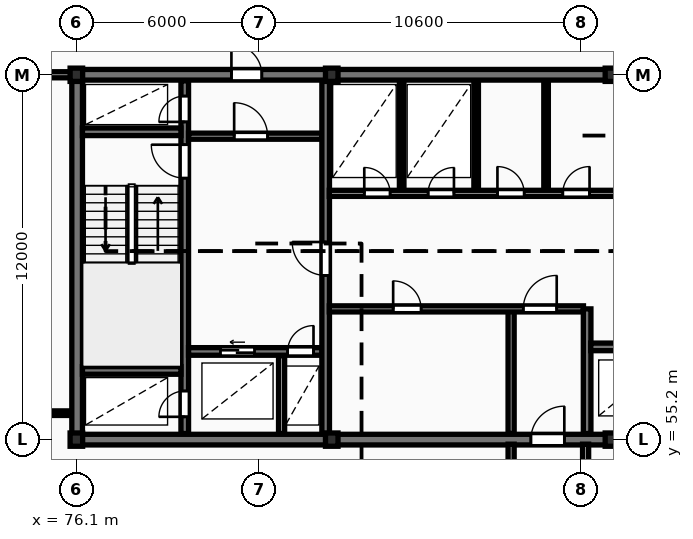
"""IFC4 building model, lengths in metres.
Left out: names, types, materials, properties, quantities, classifications, styles, units other than length and angle.
Written with IfcOpenShell. Run it as: python <this file> out.ifc"""

import sys

from ifc_helpers import new_model, si_unit, direction, frame, frame_2d, origin, origin_2d, place, context, subcontext, project, spatial, rectangle, i_section, extrude, element, fill, save


model = new_model("IFC4")
c1 = context("Model", 3, precision=1e-05, world=origin(), true_north=direction((0.0, 1.0)))
c2 = subcontext(c1, "Body", "Model", "MODEL_VIEW")
j1 = project(units=[si_unit("LENGTHUNIT", "METRE"), si_unit("PLANEANGLEUNIT", "RADIAN")], contexts=[c1])
p1 = place(None, origin())
s1 = spatial("IfcSite", under=j1, at=p1, CompositionType="ELEMENT")
p2 = place(p1, origin())
s2 = spatial("IfcBuilding", under=s1, at=p2, CompositionType="ELEMENT")
p3 = place(p2, frame((0.0, 0.0, 150.1)))
s3 = spatial("IfcBuildingStorey", under=s2, at=p3, CompositionType="ELEMENT", Elevation=150.1)
for number, where, z_axis, x_axis in (
    (1, (76.1, 55.2, 0.0), (0.0, 0.0, 1.0), (1.0, 0.0, 0.0)),
    (2, (76.1, 67.2, 0.0), (0.0, 0.0, 1.0), (1.0, 0.0, 0.0)),
    (3, (84.5, 55.2, 0.0), (0.0, 0.0, 1.0), (1.0, 0.0, 0.0)),
    (4, (84.5, 67.2, 0.0), (0.0, 0.0, 1.0), (1.0, 0.0, 0.0)),
    (5, (93.7, 55.2, 0.0), (0.0, 0.0, 1.0), (1.0, 0.0, 0.0)),
    (6, (93.7, 67.2, 0.0), (0.0, 0.0, 1.0), (1.0, 0.0, 0.0)),
):
    element("IfcColumn", number, at=place(p3, frame(where, z_axis=z_axis, x_axis=x_axis)), inside=s3, PredefinedType="COLUMN", context=c2, shape_type="SweptSolid", body=[
        extrude(i_section(OverallWidth=0.412, OverallDepth=0.437, WebThickness=0.036, FlangeThickness=0.052, FilletRadius=0.015, at=origin_2d()), origin(), (0.0, 0.0, 1.0), 3.6),
    ])
p4 = place(p3, frame((75.95, 55.2, 0.0), z_axis=(0.0, 0.0, 1.0), x_axis=(1.0, 0.0, 0.0)))
e7 = element("IfcWall", 7, at=p4, inside=s3, PredefinedType="SHEAR", context=c2, shape_type="SweptSolid", body=[
    extrude(rectangle(XDim=36.3, YDim=0.35, at=frame_2d((18.15, 0.0))), origin(), (0.0, 0.0, 1.0), 3.6),
])
p5 = place(p4, frame((15.1, 0.0, 0.0)))
e8 = element("IfcOpeningElement", 8, at=p5, cuts=e7, PredefinedType="OPENING", context=c2, shape_type="SweptSolid", body=[
    extrude(rectangle(XDim=1.1, YDim=2.1, at=frame_2d((0.55, 1.05))), frame((0.0, 0.185, 0.0), z_axis=(0.0, -1.0, 0.0), x_axis=(1.0, 0.0, 0.0)), (0.0, 0.0, 1.0), 0.37),
])
p6 = place(p3, frame((76.125, 55.375, 0.0), z_axis=(0.0, 0.0, 1.0), x_axis=(0.0, 1.0, 0.0)))
e9 = element("IfcWall", 9, at=p6, inside=s3, PredefinedType="SHEAR", context=c2, shape_type="SweptSolid", body=[
    extrude(rectangle(XDim=11.65, YDim=0.35, at=frame_2d((5.825, 0.0))), origin(), (0.0, 0.0, 1.0), 3.6),
])
p7 = place(p3, frame((75.95, 67.2, 0.0), z_axis=(0.0, 0.0, 1.0), x_axis=(1.0, 0.0, 0.0)))
e10 = element("IfcWall", 10, at=p7, inside=s3, PredefinedType="SHEAR", context=c2, shape_type="SweptSolid", body=[
    extrude(rectangle(XDim=36.3, YDim=0.35, at=frame_2d((18.15, 0.0))), origin(), (0.0, 0.0, 1.0), 3.6),
])
p8 = place(p7, frame((5.25, 0.0, 0.0)))
e11 = element("IfcOpeningElement", 11, at=p8, cuts=e10, PredefinedType="OPENING", context=c2, shape_type="SweptSolid", body=[
    extrude(rectangle(XDim=1.0, YDim=2.15, at=frame_2d((0.5, 1.075))), frame((0.0, 0.185, 0.0), z_axis=(0.0, -1.0, 0.0), x_axis=(1.0, 0.0, 0.0)), (0.0, 0.0, 1.0), 0.37),
])
p9 = place(p7, frame((21.6, 0.0, 0.0)))
e12 = element("IfcOpeningElement", 12, at=p9, cuts=e10, PredefinedType="OPENING", context=c2, shape_type="SweptSolid", body=[
    extrude(rectangle(XDim=1.5, YDim=2.2, at=frame_2d((0.75, 1.1))), frame((0.0, 0.185, 0.0), z_axis=(0.0, -1.0, 0.0), x_axis=(1.0, 0.0, 0.0)), (0.0, 0.0, 1.0), 0.37),
])
p10 = place(p7, frame((30.45, 0.0, 0.0)))
e13 = element("IfcOpeningElement", 13, at=p10, cuts=e10, PredefinedType="OPENING", context=c2, shape_type="SweptSolid", body=[
    extrude(rectangle(XDim=1.0, YDim=2.15, at=frame_2d((0.5, 1.075))), frame((0.0, 0.185, 0.0), z_axis=(0.0, -1.0, 0.0), x_axis=(1.0, 0.0, 0.0)), (0.0, 0.0, 1.0), 0.37),
])
p11 = place(p3, frame((79.665, 55.4, 0.0), z_axis=(0.0, 0.0, 1.0), x_axis=(0.0, 1.0, 0.0)))
e14 = element("IfcWall", 14, at=p11, inside=s3, PredefinedType="SHEAR", context=c2, shape_type="SweptSolid", body=[
    extrude(rectangle(XDim=11.6, YDim=0.25, at=frame_2d((5.8, 0.0))), origin(), (0.0, 0.0, 1.0), 3.6),
])
p12 = place(p11, frame((0.55, 0.0, 0.0)))
e15 = element("IfcOpeningElement", 15, at=p12, cuts=e14, PredefinedType="OPENING", context=c2, shape_type="SweptSolid", body=[
    extrude(rectangle(XDim=0.85, YDim=2.05, at=frame_2d((0.425, 1.025))), frame((0.0, 0.135, 0.0), z_axis=(0.0, -1.0, 0.0), x_axis=(1.0, 0.0, 0.0)), (0.0, 0.0, 1.0), 0.27),
])
p13 = place(p11, frame((8.4, 0.0, 0.0)))
e16 = element("IfcOpeningElement", 16, at=p13, cuts=e14, PredefinedType="OPENING", context=c2, shape_type="SweptSolid", body=[
    extrude(rectangle(XDim=1.1, YDim=2.1, at=frame_2d((0.55, 1.05))), frame((0.0, 0.135, 0.0), z_axis=(0.0, -1.0, 0.0), x_axis=(1.0, 0.0, 0.0)), (0.0, 0.0, 1.0), 0.27),
])
p14 = place(p11, frame((10.25, 0.0, 0.0)))
e17 = element("IfcOpeningElement", 17, at=p14, cuts=e14, PredefinedType="OPENING", context=c2, shape_type="SweptSolid", body=[
    extrude(rectangle(XDim=0.85, YDim=2.05, at=frame_2d((0.425, 1.025))), frame((0.0, 0.135, 0.0), z_axis=(0.0, -1.0, 0.0), x_axis=(1.0, 0.0, 0.0)), (0.0, 0.0, 1.0), 0.27),
])
for number, where, z_axis, x_axis in (
    (18, (76.3, 57.475, 0.0), (0.0, 0.0, 1.0), (1.0, 0.0, 0.0)),
    (19, (76.3, 65.325, 0.0), (0.0, 0.0, 1.0), (1.0, 0.0, 0.0)),
):
    element("IfcWall", number, at=place(p3, frame(where, z_axis=z_axis, x_axis=x_axis)), inside=s3, PredefinedType="SHEAR", context=c2, shape_type="SweptSolid", body=[
        extrude(rectangle(XDim=3.24, YDim=0.25, at=frame_2d((1.62, 0.0))), origin(), (0.0, 0.0, 1.0), 3.6),
    ])
p15 = place(p3, frame((79.79, 58.1, 0.0), z_axis=(0.0, 0.0, 1.0), x_axis=(1.0, 0.0, 0.0)))
e20 = element("IfcWall", 20, at=p15, inside=s3, PredefinedType="SHEAR", context=c2, shape_type="SweptSolid", body=[
    extrude(rectangle(XDim=4.39, YDim=0.25, at=frame_2d((2.195, 0.0))), origin(), (0.0, 0.0, 1.0), 3.6),
])
p16 = place(p15, frame((1.05, 0.0, 0.0)))
e21 = element("IfcOpeningElement", 21, at=p16, cuts=e20, PredefinedType="OPENING", context=c2, shape_type="SweptSolid", body=[
    extrude(rectangle(XDim=1.12, YDim=2.12, at=frame_2d((0.56, 1.06))), frame((0.0, 0.135, 0.0), z_axis=(0.0, -1.0, 0.0), x_axis=(1.0, 0.0, 0.0)), (0.0, 0.0, 1.0), 0.27),
])
p17 = place(p15, frame((3.26, 0.0, 0.0)))
e22 = element("IfcOpeningElement", 22, at=p17, cuts=e20, PredefinedType="OPENING", context=c2, shape_type="SweptSolid", body=[
    extrude(rectangle(XDim=0.85, YDim=2.05, at=frame_2d((0.425, 1.025))), frame((0.0, 0.135, 0.0), z_axis=(0.0, -1.0, 0.0), x_axis=(1.0, 0.0, 0.0)), (0.0, 0.0, 1.0), 0.27),
])
p18 = place(p3, frame((82.85, 55.4, 0.0), z_axis=(0.0, 0.0, 1.0), x_axis=(0.0, 1.0, 0.0)))
e23 = element("IfcWall", 23, at=p18, inside=s3, PredefinedType="PARTITIONING", context=c2, shape_type="SweptSolid", body=[
    extrude(rectangle(XDim=2.56, YDim=0.2, at=frame_2d((1.28, 0.0))), origin(), (0.0, 0.0, 1.0), 3.31),
])
p19 = place(p3, frame((79.79, 65.18, 0.0), z_axis=(0.0, 0.0, 1.0), x_axis=(1.0, 0.0, 0.0)))
e24 = element("IfcWall", 24, at=p19, inside=s3, PredefinedType="PARTITIONING", context=c2, shape_type="SweptSolid", body=[
    extrude(rectangle(XDim=4.39, YDim=0.2, at=frame_2d((2.195, 0.0))), origin(), (0.0, 0.0, 1.0), 3.31),
])
p20 = place(p19, frame((1.5, 0.0, 0.0)))
e25 = element("IfcOpeningElement", 25, at=p20, cuts=e24, PredefinedType="OPENING", context=c2, shape_type="SweptSolid", body=[
    extrude(rectangle(XDim=1.1, YDim=2.1, at=frame_2d((0.55, 1.05))), frame((0.0, 0.11, 0.0), z_axis=(0.0, -1.0, 0.0), x_axis=(1.0, 0.0, 0.0)), (0.0, 0.0, 1.0), 0.22),
])
p21 = place(p3, frame((84.3, 55.4, 0.0), z_axis=(0.0, 0.0, 1.0), x_axis=(0.0, 1.0, 0.0)))
e26 = element("IfcWall", 26, at=p21, inside=s3, PredefinedType="SHEAR", context=c2, shape_type="SweptSolid", body=[
    extrude(rectangle(XDim=11.6, YDim=0.25, at=frame_2d((5.8, 0.0))), origin(), (0.0, 0.0, 1.0), 3.6),
])
p22 = place(p21, frame((5.2, 0.0, 0.0)))
e27 = element("IfcOpeningElement", 27, at=p22, cuts=e26, PredefinedType="OPENING", context=c2, shape_type="SweptSolid", body=[
    extrude(rectangle(XDim=1.1, YDim=2.1, at=frame_2d((0.55, 1.05))), frame((0.0, 0.135, 0.0), z_axis=(0.0, -1.0, 0.0), x_axis=(1.0, 0.0, 0.0)), (0.0, 0.0, 1.0), 0.27),
])
p23 = place(p3, frame((90.4, 55.4, 0.0), z_axis=(0.0, 0.0, 1.0), x_axis=(0.0, 1.0, 0.0)))
e28 = element("IfcWall", 28, at=p23, inside=s3, PredefinedType="PARTITIONING", context=c2, shape_type="SweptSolid", body=[
    extrude(rectangle(XDim=4.1, YDim=0.2, at=frame_2d((2.05, 0.0))), origin(), (0.0, 0.0, 1.0), 3.31),
])
p24 = place(p3, frame((84.42, 59.5, 0.0), z_axis=(0.0, 0.0, 1.0), x_axis=(1.0, 0.0, 0.0)))
e29 = element("IfcWall", 29, at=p24, inside=s3, PredefinedType="PARTITIONING", context=c2, shape_type="SweptSolid", body=[
    extrude(rectangle(XDim=8.36, YDim=0.2, at=frame_2d((4.18, 0.0))), origin(), (0.0, 0.0, 1.0), 3.31),
])
p25 = place(p24, frame((2.1, 0.0, 0.0)))
e30 = element("IfcOpeningElement", 30, at=p25, cuts=e29, PredefinedType="OPENING", context=c2, shape_type="SweptSolid", body=[
    extrude(rectangle(XDim=0.92, YDim=2.08, at=frame_2d((0.46, 1.04))), frame((0.0, 0.11, 0.0), z_axis=(0.0, -1.0, 0.0), x_axis=(1.0, 0.0, 0.0)), (0.0, 0.0, 1.0), 0.22),
])
p26 = place(p24, frame((6.38, 0.0, 0.0)))
e31 = element("IfcOpeningElement", 31, at=p26, cuts=e29, PredefinedType="OPENING", context=c2, shape_type="SweptSolid", body=[
    extrude(rectangle(XDim=1.1, YDim=2.1, at=frame_2d((0.55, 1.05))), frame((0.0, 0.11, 0.0), z_axis=(0.0, -1.0, 0.0), x_axis=(1.0, 0.0, 0.0)), (0.0, 0.0, 1.0), 0.22),
])
p27 = place(p3, frame((92.9, 55.4, 0.0), z_axis=(0.0, 0.0, 1.0), x_axis=(0.0, 1.0, 0.0)))
e32 = element("IfcWall", 32, at=p27, inside=s3, PredefinedType="SHEAR", context=c2, shape_type="SweptSolid", body=[
    extrude(rectangle(XDim=4.1, YDim=0.25, at=frame_2d((2.05, 0.0))), origin(), (0.0, 0.0, 1.0), 3.6),
])
p28 = place(p3, frame((93.02, 58.25, 0.0), z_axis=(0.0, 0.0, 1.0), x_axis=(1.0, 0.0, 0.0)))
e33 = element("IfcWall", 33, at=p28, inside=s3, PredefinedType="SHEAR", context=c2, shape_type="SweptSolid", body=[
    extrude(rectangle(XDim=8.36, YDim=0.25, at=frame_2d((4.18, 0.0))), origin(), (0.0, 0.0, 1.0), 3.6),
])
p29 = place(p28, frame((0.82, 0.0, 0.0)))
e34 = element("IfcOpeningElement", 34, at=p29, cuts=e33, PredefinedType="OPENING", context=c2, shape_type="SweptSolid", body=[
    extrude(rectangle(XDim=1.12, YDim=2.12, at=frame_2d((0.56, 1.06))), frame((0.0, 0.135, 0.0), z_axis=(0.0, -1.0, 0.0), x_axis=(1.0, 0.0, 0.0)), (0.0, 0.0, 1.0), 0.27),
])
p30 = place(p28, frame((3.62, 0.0, 0.0)))
e35 = element("IfcOpeningElement", 35, at=p30, cuts=e33, PredefinedType="OPENING", context=c2, shape_type="SweptSolid", body=[
    extrude(rectangle(XDim=1.12, YDim=2.12, at=frame_2d((0.56, 1.06))), frame((0.0, 0.135, 0.0), z_axis=(0.0, -1.0, 0.0), x_axis=(1.0, 0.0, 0.0)), (0.0, 0.0, 1.0), 0.27),
])
p31 = place(p28, frame((6.42, 0.0, 0.0)))
e36 = element("IfcOpeningElement", 36, at=p31, cuts=e33, PredefinedType="OPENING", context=c2, shape_type="SweptSolid", body=[
    extrude(rectangle(XDim=1.12, YDim=2.12, at=frame_2d((0.56, 1.06))), frame((0.0, 0.135, 0.0), z_axis=(0.0, -1.0, 0.0), x_axis=(1.0, 0.0, 0.0)), (0.0, 0.0, 1.0), 0.27),
])
for number, where, z_axis, x_axis in (
    (37, (86.8, 63.4, 0.0), (0.0, 0.0, 1.0), (0.0, 1.0, 0.0)),
    (38, (89.25, 63.4, 0.0), (0.0, 0.0, 1.0), (0.0, 1.0, 0.0)),
    (39, (91.55, 63.4, 0.0), (0.0, 0.0, 1.0), (0.0, 1.0, 0.0)),
):
    element("IfcWall", number, at=place(p3, frame(where, z_axis=z_axis, x_axis=x_axis)), inside=s3, PredefinedType="PARTITIONING", context=c2, shape_type="SweptSolid", body=[
        extrude(rectangle(XDim=3.6, YDim=0.15, at=frame_2d((1.8, 0.0))), origin(), (0.0, 0.0, 1.0), 3.31),
    ])
p32 = place(p3, frame((84.42, 63.3, 0.0), z_axis=(0.0, 0.0, 1.0), x_axis=(1.0, 0.0, 0.0)))
e40 = element("IfcWall", 40, at=p32, inside=s3, PredefinedType="PARTITIONING", context=c2, shape_type="SweptSolid", body=[
    extrude(rectangle(XDim=19.83, YDim=0.2, at=frame_2d((9.915, 0.0))), origin(), (0.0, 0.0, 1.0), 3.31),
])
p33 = place(p32, frame((1.15, 0.0, 0.0)))
e41 = element("IfcOpeningElement", 41, at=p33, cuts=e40, PredefinedType="OPENING", context=c2, shape_type="SweptSolid", body=[
    extrude(rectangle(XDim=0.85, YDim=2.05, at=frame_2d((0.425, 1.025))), frame((0.0, 0.11, 0.0), z_axis=(0.0, -1.0, 0.0), x_axis=(1.0, 0.0, 0.0)), (0.0, 0.0, 1.0), 0.22),
])
p34 = place(p32, frame((3.25, 0.0, 0.0)))
e42 = element("IfcOpeningElement", 42, at=p34, cuts=e40, PredefinedType="OPENING", context=c2, shape_type="SweptSolid", body=[
    extrude(rectangle(XDim=0.85, YDim=2.05, at=frame_2d((0.425, 1.025))), frame((0.0, 0.11, 0.0), z_axis=(0.0, -1.0, 0.0), x_axis=(1.0, 0.0, 0.0)), (0.0, 0.0, 1.0), 0.22),
])
p35 = place(p32, frame((13.08, 0.0, 0.0)))
e43 = element("IfcOpeningElement", 43, at=p35, cuts=e40, PredefinedType="OPENING", context=c2, shape_type="SweptSolid", body=[
    extrude(rectangle(XDim=1.5, YDim=2.2, at=frame_2d((0.75, 1.1))), frame((0.0, 0.11, 0.0), z_axis=(0.0, -1.0, 0.0), x_axis=(1.0, 0.0, 0.0)), (0.0, 0.0, 1.0), 0.22),
])
p36 = place(p32, frame((5.53, 0.0, 0.0)))
e44 = element("IfcOpeningElement", 44, at=p36, cuts=e40, PredefinedType="OPENING", context=c2, shape_type="SweptSolid", body=[
    extrude(rectangle(XDim=0.88, YDim=2.06, at=frame_2d((0.44, 1.03))), frame((0.0, 0.11, 0.0), z_axis=(0.0, -1.0, 0.0), x_axis=(1.0, 0.0, 0.0)), (0.0, 0.0, 1.0), 0.22),
])
p37 = place(p32, frame((7.68, 0.0, 0.0)))
e45 = element("IfcOpeningElement", 45, at=p37, cuts=e40, PredefinedType="OPENING", context=c2, shape_type="SweptSolid", body=[
    extrude(rectangle(XDim=0.88, YDim=2.06, at=frame_2d((0.44, 1.03))), frame((0.0, 0.11, 0.0), z_axis=(0.0, -1.0, 0.0), x_axis=(1.0, 0.0, 0.0)), (0.0, 0.0, 1.0), 0.22),
])
p38 = place(p32, frame((10.43, 0.0, 0.0)))
e46 = element("IfcOpeningElement", 46, at=p38, cuts=e40, PredefinedType="OPENING", context=c2, shape_type="SweptSolid", body=[
    extrude(rectangle(XDim=0.85, YDim=2.05, at=frame_2d((0.425, 1.025))), frame((0.0, 0.11, 0.0), z_axis=(0.0, -1.0, 0.0), x_axis=(1.0, 0.0, 0.0)), (0.0, 0.0, 1.0), 0.22),
])
p39 = place(p32, frame((16.23, 0.0, 0.0)))
e47 = element("IfcOpeningElement", 47, at=p39, cuts=e40, PredefinedType="OPENING", context=c2, shape_type="SweptSolid", body=[
    extrude(rectangle(XDim=0.96, YDim=2.1, at=frame_2d((0.48, 1.05))), frame((0.0, 0.11, 0.0), z_axis=(0.0, -1.0, 0.0), x_axis=(1.0, 0.0, 0.0)), (0.0, 0.0, 1.0), 0.22),
])
p40 = place(p32, frame((18.68, 0.0, 0.0)))
e48 = element("IfcOpeningElement", 48, at=p40, cuts=e40, PredefinedType="OPENING", context=c2, shape_type="SweptSolid", body=[
    extrude(rectangle(XDim=0.84, YDim=2.04, at=frame_2d((0.42, 1.02))), frame((0.0, 0.11, 0.0), z_axis=(0.0, -1.0, 0.0), x_axis=(1.0, 0.0, 0.0)), (0.0, 0.0, 1.0), 0.22),
])
p41 = place(p3, frame((69.17, 56.07, 0.0), z_axis=(0.0, 0.0, 1.0), x_axis=(1.0, 0.0, 0.0)))
e49 = element("IfcWall", 49, at=p41, inside=s3, PredefinedType="PARTITIONING", context=c2, shape_type="SweptSolid", body=[
    extrude(rectangle(XDim=6.76, YDim=0.15, at=frame_2d((3.38, 0.0))), origin(), (0.0, 0.0, 1.0), 3.31),
])
p42 = place(p41, frame((1.362, 0.0, 0.0)))
e50 = element("IfcOpeningElement", 50, at=p42, cuts=e49, PredefinedType="OPENING", context=c2, shape_type="SweptSolid", body=[
    extrude(rectangle(XDim=0.84, YDim=2.04, at=frame_2d((0.42, 1.02))), frame((0.0, 0.085, 0.0), z_axis=(0.0, -1.0, 0.0), x_axis=(1.0, 0.0, 0.0)), (0.0, 0.0, 1.0), 0.17),
])
p43 = place(p41, frame((4.277, 0.0, 0.0)))
e51 = element("IfcOpeningElement", 51, at=p43, cuts=e49, PredefinedType="OPENING", context=c2, shape_type="SweptSolid", body=[
    extrude(rectangle(XDim=0.88, YDim=2.06, at=frame_2d((0.44, 1.03))), frame((0.0, 0.085, 0.0), z_axis=(0.0, -1.0, 0.0), x_axis=(1.0, 0.0, 0.0)), (0.0, 0.0, 1.0), 0.17),
])
p44 = place(p3, frame((57.6, 67.2, 0.0), z_axis=(0.0, 0.0, 1.0), x_axis=(1.0, 0.0, 0.0)))
e52 = element("IfcWall", 52, at=p44, inside=s3, PredefinedType="PARTITIONING", context=c2, shape_type="SweptSolid", body=[
    extrude(rectangle(XDim=18.35, YDim=0.2, at=frame_2d((9.175, 0.0))), origin(), (0.0, 0.0, 1.0), 2.773),
])
p45 = place(p44, frame((11.87, 0.0, 0.0)))
e53 = element("IfcOpeningElement", 53, at=p45, cuts=e52, PredefinedType="OPENING", context=c2, shape_type="SweptSolid", body=[
    extrude(rectangle(XDim=0.95, YDim=2.15, at=frame_2d((0.475, 1.075))), frame((0.0, 0.11, 0.0), z_axis=(0.0, -1.0, 0.0), x_axis=(1.0, 0.0, 0.0)), (0.0, 0.0, 1.0), 0.22),
])
for number, where, z_axis, x_axis in (
    (54, (90.4, 50.85, 0.0), (0.0, 0.0, 1.0), (0.0, 1.0, 0.0)),
    (55, (92.85, 50.85, 0.0), (0.0, 0.0, 1.0), (0.0, 1.0, 0.0)),
):
    element("IfcWall", number, at=place(p3, frame(where, z_axis=z_axis, x_axis=x_axis)), inside=s3, PredefinedType="PARTITIONING", context=c2, shape_type="SweptSolid", body=[
        extrude(rectangle(XDim=4.2, YDim=0.2, at=frame_2d((2.1, 0.0))), origin(), (0.0, 0.0, 1.0), 3.31),
    ])
p46 = place(p5, origin())
e56 = element("IfcDoor", 56, at=p46, inside=s3, OperationType="SINGLE_SWING_RIGHT", PredefinedType="DOOR", context=c2, shape_type="SweptSolid", body=[
    extrude(rectangle(XDim=1.1, YDim=2.1, at=frame_2d((0.55, 1.05))), frame((0.0, 0.025, 0.0), z_axis=(0.0, -1.0, 0.0), x_axis=(1.0, 0.0, 0.0)), (0.0, 0.0, 1.0), 0.05),
])
fill(e8, e56)
p47 = place(p8, origin())
e57 = element("IfcDoor", 57, at=p47, inside=s3, OperationType="SINGLE_SWING_LEFT", PredefinedType="DOOR", context=c2, shape_type="SweptSolid", body=[
    extrude(rectangle(XDim=1.0, YDim=2.15, at=frame_2d((0.5, 1.075))), frame((0.0, 0.025, 0.0), z_axis=(0.0, -1.0, 0.0), x_axis=(1.0, 0.0, 0.0)), (0.0, 0.0, 1.0), 0.05),
])
fill(e11, e57)
p48 = place(p12, origin())
e58 = element("IfcDoor", 58, at=p48, inside=s3, OperationType="SINGLE_SWING_LEFT", PredefinedType="DOOR", context=c2, shape_type="SweptSolid", body=[
    extrude(rectangle(XDim=0.85, YDim=2.05, at=frame_2d((0.425, 1.025))), frame((0.0, 0.025, 0.0), z_axis=(0.0, -1.0, 0.0), x_axis=(1.0, 0.0, 0.0)), (0.0, 0.0, 1.0), 0.05),
])
fill(e15, e58)
p49 = place(p13, origin())
e59 = element("IfcDoor", 59, at=p49, inside=s3, OperationType="SINGLE_SWING_RIGHT", PredefinedType="DOOR", context=c2, shape_type="SweptSolid", body=[
    extrude(rectangle(XDim=1.1, YDim=2.1, at=frame_2d((0.55, 1.05))), frame((0.0, 0.025, 0.0), z_axis=(0.0, -1.0, 0.0), x_axis=(1.0, 0.0, 0.0)), (0.0, 0.0, 1.0), 0.05),
])
fill(e16, e59)
p50 = place(p14, origin())
e60 = element("IfcDoor", 60, at=p50, inside=s3, OperationType="SINGLE_SWING_LEFT", PredefinedType="DOOR", context=c2, shape_type="SweptSolid", body=[
    extrude(rectangle(XDim=0.85, YDim=2.05, at=frame_2d((0.425, 1.025))), frame((0.0, 0.025, 0.0), z_axis=(0.0, -1.0, 0.0), x_axis=(1.0, 0.0, 0.0)), (0.0, 0.0, 1.0), 0.05),
])
fill(e17, e60)
p51 = place(p16, origin())
e61 = element("IfcDoor", 61, at=p51, inside=s3, OperationType="SLIDING_TO_LEFT", PredefinedType="DOOR", context=c2, shape_type="SweptSolid", body=[
    extrude(rectangle(XDim=1.12, YDim=2.12, at=frame_2d((0.56, 1.06))), frame((0.0, 0.025, 0.0), z_axis=(0.0, -1.0, 0.0), x_axis=(1.0, 0.0, 0.0)), (0.0, 0.0, 1.0), 0.05),
])
fill(e21, e61)
p52 = place(p17, origin())
e62 = element("IfcDoor", 62, at=p52, inside=s3, OperationType="SINGLE_SWING_RIGHT", PredefinedType="DOOR", context=c2, shape_type="SweptSolid", body=[
    extrude(rectangle(XDim=0.85, YDim=2.05, at=frame_2d((0.425, 1.025))), frame((0.0, 0.025, 0.0), z_axis=(0.0, -1.0, 0.0), x_axis=(1.0, 0.0, 0.0)), (0.0, 0.0, 1.0), 0.05),
])
fill(e22, e62)
p53 = place(p20, origin())
e63 = element("IfcDoor", 63, at=p53, inside=s3, OperationType="SINGLE_SWING_LEFT", PredefinedType="DOOR", context=c2, shape_type="SweptSolid", body=[
    extrude(rectangle(XDim=1.1, YDim=2.1, at=frame_2d((0.55, 1.05))), frame((0.0, 0.025, 0.0), z_axis=(0.0, -1.0, 0.0), x_axis=(1.0, 0.0, 0.0)), (0.0, 0.0, 1.0), 0.05),
])
fill(e25, e63)
p54 = place(p22, origin())
e64 = element("IfcDoor", 64, at=p54, inside=s3, OperationType="SINGLE_SWING_RIGHT", PredefinedType="DOOR", context=c2, shape_type="SweptSolid", body=[
    extrude(rectangle(XDim=1.1, YDim=2.1, at=frame_2d((0.55, 1.05))), frame((0.0, 0.025, 0.0), z_axis=(0.0, -1.0, 0.0), x_axis=(1.0, 0.0, 0.0)), (0.0, 0.0, 1.0), 0.05),
])
fill(e27, e64)
p55 = place(p25, origin())
e65 = element("IfcDoor", 65, at=p55, inside=s3, OperationType="SINGLE_SWING_LEFT", PredefinedType="DOOR", context=c2, shape_type="SweptSolid", body=[
    extrude(rectangle(XDim=0.92, YDim=2.08, at=frame_2d((0.46, 1.04))), frame((0.0, 0.025, 0.0), z_axis=(0.0, -1.0, 0.0), x_axis=(1.0, 0.0, 0.0)), (0.0, 0.0, 1.0), 0.05),
])
fill(e30, e65)
p56 = place(p26, origin())
e66 = element("IfcDoor", 66, at=p56, inside=s3, OperationType="SINGLE_SWING_RIGHT", PredefinedType="DOOR", context=c2, shape_type="SweptSolid", body=[
    extrude(rectangle(XDim=1.1, YDim=2.1, at=frame_2d((0.55, 1.05))), frame((0.0, 0.025, 0.0), z_axis=(0.0, -1.0, 0.0), x_axis=(1.0, 0.0, 0.0)), (0.0, 0.0, 1.0), 0.05),
])
fill(e31, e66)
p57 = place(p33, origin())
e67 = element("IfcDoor", 67, at=p57, inside=s3, OperationType="SINGLE_SWING_LEFT", PredefinedType="DOOR", context=c2, shape_type="SweptSolid", body=[
    extrude(rectangle(XDim=0.85, YDim=2.05, at=frame_2d((0.425, 1.025))), frame((0.0, 0.025, 0.0), z_axis=(0.0, -1.0, 0.0), x_axis=(1.0, 0.0, 0.0)), (0.0, 0.0, 1.0), 0.05),
])
fill(e41, e67)
p58 = place(p34, origin())
e68 = element("IfcDoor", 68, at=p58, inside=s3, OperationType="SINGLE_SWING_RIGHT", PredefinedType="DOOR", context=c2, shape_type="SweptSolid", body=[
    extrude(rectangle(XDim=0.85, YDim=2.05, at=frame_2d((0.425, 1.025))), frame((0.0, 0.025, 0.0), z_axis=(0.0, -1.0, 0.0), x_axis=(1.0, 0.0, 0.0)), (0.0, 0.0, 1.0), 0.05),
])
fill(e42, e68)
p59 = place(p36, origin())
e69 = element("IfcDoor", 69, at=p59, inside=s3, OperationType="SINGLE_SWING_LEFT", PredefinedType="DOOR", context=c2, shape_type="SweptSolid", body=[
    extrude(rectangle(XDim=0.88, YDim=2.06, at=frame_2d((0.44, 1.03))), frame((0.0, 0.025, 0.0), z_axis=(0.0, -1.0, 0.0), x_axis=(1.0, 0.0, 0.0)), (0.0, 0.0, 1.0), 0.05),
])
fill(e44, e69)
p60 = place(p37, origin())
e70 = element("IfcDoor", 70, at=p60, inside=s3, OperationType="SINGLE_SWING_RIGHT", PredefinedType="DOOR", context=c2, shape_type="SweptSolid", body=[
    extrude(rectangle(XDim=0.88, YDim=2.06, at=frame_2d((0.44, 1.03))), frame((0.0, 0.025, 0.0), z_axis=(0.0, -1.0, 0.0), x_axis=(1.0, 0.0, 0.0)), (0.0, 0.0, 1.0), 0.05),
])
fill(e45, e70)
save(model, sys.argv[1])
